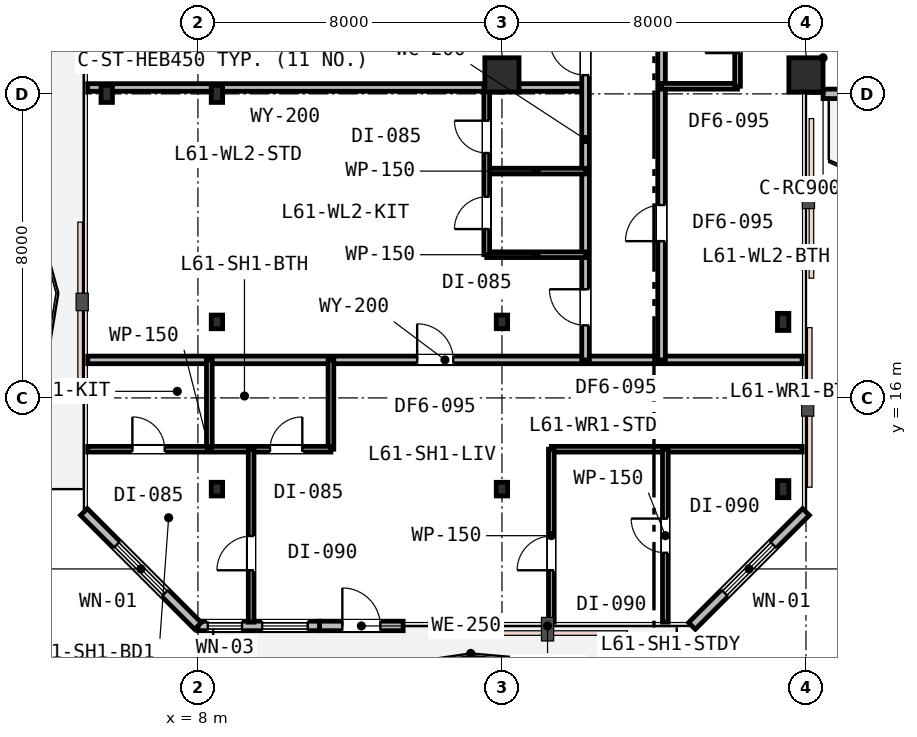
"""IFC4 building model, lengths in metres.
Left out: names, types, materials, properties, quantities, classifications, styles, units other than length and angle.
Written with IfcOpenShell. Run it as: python <this file> out.ifc"""

import sys

from ifc_helpers import new_model, si_unit, direction, frame, frame_2d, origin, origin_2d, place, context, subcontext, project, spatial, rectangle, i_section, extrude, element, fill, save


model = new_model("IFC4")
c1 = context("Model", 3, precision=1e-05, world=origin(), true_north=direction((0.0, 1.0)))
c2 = subcontext(c1, "Body", "Model", "MODEL_VIEW")
j1 = project(units=[si_unit("LENGTHUNIT", "METRE"), si_unit("PLANEANGLEUNIT", "RADIAN")], contexts=[c1])
p1 = place(None, origin())
s1 = spatial("IfcSite", under=j1, at=p1, CompositionType="ELEMENT")
p2 = place(p1, origin())
s2 = spatial("IfcBuilding", under=s1, at=p2, CompositionType="ELEMENT")
p3 = place(p2, frame((0.0, 0.0, 237.4)))
s3 = spatial("IfcBuildingStorey", under=s2, at=p3, CompositionType="ELEMENT", Elevation=237.4)
p4 = place(p3, frame((8.5, 24.0, 0.0), z_axis=(0.0, 0.0, 1.0), x_axis=(1.0, 0.0, 0.0)))
e1 = element("IfcColumn", 1, at=p4, inside=s3, PredefinedType="COLUMN", context=c2, shape_type="SweptSolid", body=[
    extrude(i_section(OverallWidth=0.3, OverallDepth=0.45, WebThickness=0.014, FlangeThickness=0.026, FilletRadius=0.027, at=origin_2d()), origin(), (0.0, 0.0, 1.0), 3.8),
])
for number, where, z_axis, x_axis in (
    (2, (16.0, 24.5, 0.0), (0.0, 0.0, 1.0), (1.0, 0.0, 0.0)),
    (3, (24.0, 24.5, 0.0), (0.0, 0.0, 1.0), (1.0, 0.0, 0.0)),
):
    element("IfcColumn", number, at=place(p3, frame(where, z_axis=z_axis, x_axis=x_axis)), inside=s3, PredefinedType="COLUMN", context=c2, shape_type="SweptSolid", body=[
        extrude(rectangle(XDim=0.9, YDim=0.9, at=origin_2d()), origin(), (0.0, 0.0, 1.0), 3.8),
    ])
for number, where, z_axis, x_axis in (
    (4, (5.6, 24.0, 0.0), (0.0, 0.0, 1.0), (1.0, 0.0, 0.0)),
    (5, (23.4, 13.6, 0.0), (0.0, 0.0, 1.0), (1.0, 0.0, 0.0)),
    (6, (23.4, 18.0, 0.0), (0.0, 0.0, 1.0), (1.0, 0.0, 0.0)),
):
    element("IfcColumn", number, at=place(p3, frame(where, z_axis=z_axis, x_axis=x_axis)), inside=s3, PredefinedType="COLUMN", context=c2, shape_type="SweptSolid", body=[
        extrude(i_section(OverallWidth=0.3, OverallDepth=0.45, WebThickness=0.014, FlangeThickness=0.026, FilletRadius=0.027, at=origin_2d()), origin(), (0.0, 0.0, 1.0), 3.8),
    ])
for number, where, z_axis, x_axis in (
    (7, (8.5, 13.6, 0.0), (0.0, 0.0, 1.0), (1.0, 0.0, 0.0)),
    (8, (16.0, 13.6, 0.0), (0.0, 0.0, 1.0), (1.0, 0.0, 0.0)),
    (9, (8.5, 18.0, 0.0), (0.0, 0.0, 1.0), (1.0, 0.0, 0.0)),
    (10, (16.0, 18.0, 0.0), (0.0, 0.0, 1.0), (1.0, 0.0, 0.0)),
):
    element("IfcColumn", number, at=place(p3, frame(where, z_axis=z_axis, x_axis=x_axis)), inside=s3, PredefinedType="COLUMN", context=c2, shape_type="SweptSolid", body=[
        extrude(i_section(OverallWidth=0.3, OverallDepth=0.36, WebThickness=0.013, FlangeThickness=0.022, FilletRadius=0.027, at=origin_2d()), origin(), (0.0, 0.0, 1.0), 3.8),
    ])
p5 = place(p3, frame((11.2, 10.0, 0.0), z_axis=(0.0, 0.0, 1.0), x_axis=(1.0, 0.0, 0.0)))
e11 = element("IfcWall", 11, at=p5, inside=s3, PredefinedType="STANDARD", context=c2, shape_type="SweptSolid", body=[
    extrude(rectangle(XDim=2.2, YDim=0.25, at=frame_2d((1.1, 0.0))), origin(), (0.0, 0.0, 1.0), 3.53),
])
p6 = place(p5, frame((0.6, 0.0, 0.0)))
e12 = element("IfcOpeningElement", 12, at=p6, cuts=e11, PredefinedType="OPENING", context=c2, shape_type="SweptSolid", body=[
    extrude(rectangle(XDim=1.0, YDim=2.15, at=frame_2d((0.5, 1.075))), frame((0.0, 0.135, 0.0), z_axis=(0.0, -1.0, 0.0), x_axis=(1.0, 0.0, 0.0)), (0.0, 0.0, 1.0), 0.27),
])
p7 = place(p3, frame((8.0, 10.0, 0.0), z_axis=(0.0, 0.0, 1.0), x_axis=(1.0, 0.0, 0.0)))
e13 = element("IfcWall", 13, at=p7, inside=s3, PredefinedType="STANDARD", context=c2, shape_type="SweptSolid", body=[
    extrude(rectangle(XDim=3.2, YDim=0.25, at=frame_2d((1.6, 0.0))), origin(), (0.0, 0.0, 1.0), 3.53),
])
p8 = place(p7, frame((0.26, 0.0, 0.9)))
e14 = element("IfcOpeningElement", 14, at=p8, cuts=e13, PredefinedType="OPENING", context=c2, shape_type="SweptSolid", body=[
    extrude(rectangle(XDim=0.9, YDim=1.55, at=frame_2d((0.45, 0.775))), frame((0.0, 0.135, 0.0), z_axis=(0.0, -1.0, 0.0), x_axis=(1.0, 0.0, 0.0)), (0.0, 0.0, 1.0), 0.27),
])
p9 = place(p7, frame((1.69, 0.0, 0.85)))
e15 = element("IfcOpeningElement", 15, at=p9, cuts=e13, PredefinedType="OPENING", context=c2, shape_type="SweptSolid", body=[
    extrude(rectangle(XDim=1.2, YDim=1.6, at=frame_2d((0.6, 0.8))), frame((0.0, 0.135, 0.0), z_axis=(0.0, -1.0, 0.0), x_axis=(1.0, 0.0, 0.0)), (0.0, 0.0, 1.0), 0.27),
])
p10 = place(p3, frame((21.0, 10.0, 0.0), z_axis=(0.0, 0.0, 1.0), x_axis=(0.707106781187, 0.707106781187, 0.0)))
e16 = element("IfcWall", 16, at=p10, inside=s3, PredefinedType="STANDARD", context=c2, shape_type="SweptSolid", body=[
    extrude(rectangle(XDim=4.243, YDim=0.25, at=frame_2d((2.121, 0.0))), origin(), (0.0, 0.0, 1.0), 3.53),
])
p11 = place(p10, frame((1.221, 0.0, 0.75)))
e17 = element("IfcOpeningElement", 17, at=p11, cuts=e16, PredefinedType="OPENING", context=c2, shape_type="SweptSolid", body=[
    extrude(rectangle(XDim=1.8, YDim=1.85, at=frame_2d((0.9, 0.925))), frame((0.0, 0.135, 0.0), z_axis=(0.0, -1.0, 0.0), x_axis=(1.0, 0.0, 0.0)), (0.0, 0.0, 1.0), 0.27),
])
p12 = place(p3, frame((24.45, 24.0, 0.0), z_axis=(0.0, 0.0, 1.0), x_axis=(1.0, 0.0, 0.0)))
e18 = element("IfcWall", 18, at=p12, inside=s3, PredefinedType="STANDARD", context=c2, shape_type="SweptSolid", body=[
    extrude(rectangle(XDim=0.95, YDim=0.25, at=frame_2d((0.475, 0.0))), origin(), (0.0, 0.0, 1.0), 3.24),
])
p13 = place(p3, frame((5.0, 13.0, 0.0), z_axis=(0.0, 0.0, 1.0), x_axis=(0.707106781187, -0.707106781187, 0.0)))
e19 = element("IfcWall", 19, at=p13, inside=s3, PredefinedType="STANDARD", context=c2, shape_type="SweptSolid", body=[
    extrude(rectangle(XDim=4.243, YDim=0.25, at=frame_2d((2.121, 0.0))), origin(), (0.0, 0.0, 1.0), 3.53),
])
p14 = place(p13, frame((1.221, 0.0, 0.75)))
e20 = element("IfcOpeningElement", 20, at=p14, cuts=e19, PredefinedType="OPENING", context=c2, shape_type="SweptSolid", body=[
    extrude(rectangle(XDim=1.8, YDim=1.85, at=frame_2d((0.9, 0.925))), frame((0.0, 0.135, 0.0), z_axis=(0.0, -1.0, 0.0), x_axis=(1.0, 0.0, 0.0)), (0.0, 0.0, 1.0), 0.27),
])
p15 = place(p3, frame((5.1, 17.0, 0.0), z_axis=(0.0, 0.0, 1.0), x_axis=(1.0, 0.0, 0.0)))
e21 = element("IfcWall", 21, at=p15, inside=s3, PredefinedType="PARTITIONING", context=c2, shape_type="SweptSolid", body=[
    extrude(rectangle(XDim=18.8, YDim=0.2, at=frame_2d((9.4, 0.0))), origin(), (0.0, 0.0, 1.0), 2.92),
])
p16 = place(p15, frame((8.668, 0.0, 0.0)))
e22 = element("IfcOpeningElement", 22, at=p16, cuts=e21, PredefinedType="OPENING", context=c2, shape_type="SweptSolid", body=[
    extrude(rectangle(XDim=0.95, YDim=2.15, at=frame_2d((0.475, 1.075))), frame((0.0, 0.11, 0.0), z_axis=(0.0, -1.0, 0.0), x_axis=(1.0, 0.0, 0.0)), (0.0, 0.0, 1.0), 0.22),
])
p17 = place(p3, frame((5.1, 24.168, 0.0), z_axis=(0.0, 0.0, 1.0), x_axis=(1.0, 0.0, 0.0)))
e23 = element("IfcWall", 23, at=p17, inside=s3, PredefinedType="PARTITIONING", context=c2, shape_type="SweptSolid", body=[
    extrude(rectangle(XDim=13.1, YDim=0.2, at=frame_2d((6.55, 0.0))), origin(), (0.0, 0.0, 1.0), 2.92),
])
p18 = place(p3, frame((18.2, 17.0, 0.0), z_axis=(0.0, 0.0, 1.0), x_axis=(0.0, 1.0, 0.0)))
e24 = element("IfcWall", 24, at=p18, inside=s3, PredefinedType="PARTITIONING", context=c2, shape_type="SweptSolid", body=[
    extrude(rectangle(XDim=11.6, YDim=0.2, at=frame_2d((5.8, 0.0))), origin(), (0.0, 0.0, 1.0), 2.92),
])
p19 = place(p18, frame((7.493, 0.0, 0.0)))
e25 = element("IfcOpeningElement", 25, at=p19, cuts=e24, PredefinedType="OPENING", context=c2, shape_type="SweptSolid", body=[
    extrude(rectangle(XDim=0.95, YDim=2.15, at=frame_2d((0.475, 1.075))), frame((0.0, 0.11, 0.0), z_axis=(0.0, -1.0, 0.0), x_axis=(1.0, 0.0, 0.0)), (0.0, 0.0, 1.0), 0.22),
])
p20 = place(p18, frame((0.909, 0.0, 0.0)))
e26 = element("IfcOpeningElement", 26, at=p20, cuts=e24, PredefinedType="OPENING", context=c2, shape_type="SweptSolid", body=[
    extrude(rectangle(XDim=0.95, YDim=2.15, at=frame_2d((0.475, 1.075))), frame((0.0, 0.11, 0.0), z_axis=(0.0, -1.0, 0.0), x_axis=(1.0, 0.0, 0.0)), (0.0, 0.0, 1.0), 0.22),
])
for number, where, z_axis, x_axis in (
    (27, (15.6, 19.768, 0.0), (0.0, 0.0, 1.0), (1.0, 0.0, 0.0)),
    (28, (15.6, 21.968, 0.0), (0.0, 0.0, 1.0), (1.0, 0.0, 0.0)),
):
    element("IfcWall", number, at=place(p3, frame(where, z_axis=z_axis, x_axis=x_axis)), inside=s3, PredefinedType="PARTITIONING", context=c2, shape_type="SweptSolid", body=[
        extrude(rectangle(XDim=2.6, YDim=0.15, at=frame_2d((1.3, 0.0))), origin(), (0.0, 0.0, 1.0), 2.92),
    ])
p21 = place(p3, frame((15.6, 19.768, 0.0), z_axis=(0.0, 0.0, 1.0), x_axis=(0.0, 1.0, 0.0)))
e29 = element("IfcWall", 29, at=p21, inside=s3, PredefinedType="PARTITIONING", context=c2, shape_type="SweptSolid", body=[
    extrude(rectangle(XDim=4.4, YDim=0.15, at=frame_2d((2.2, 0.0))), origin(), (0.0, 0.0, 1.0), 2.92),
])
p22 = place(p21, frame((0.675, 0.0, 0.0)))
e30 = element("IfcOpeningElement", 30, at=p22, cuts=e29, PredefinedType="OPENING", context=c2, shape_type="SweptSolid", body=[
    extrude(rectangle(XDim=0.85, YDim=2.15, at=frame_2d((0.425, 1.075))), frame((0.0, 0.085, 0.0), z_axis=(0.0, -1.0, 0.0), x_axis=(1.0, 0.0, 0.0)), (0.0, 0.0, 1.0), 0.17),
])
p23 = place(p21, frame((2.677, 0.0, 0.0)))
e31 = element("IfcOpeningElement", 31, at=p23, cuts=e29, PredefinedType="OPENING", context=c2, shape_type="SweptSolid", body=[
    extrude(rectangle(XDim=0.85, YDim=2.15, at=frame_2d((0.425, 1.075))), frame((0.0, 0.085, 0.0), z_axis=(0.0, -1.0, 0.0), x_axis=(1.0, 0.0, 0.0)), (0.0, 0.0, 1.0), 0.17),
])
p24 = place(p3, frame((20.2, 17.0, 0.0), z_axis=(0.0, 0.0, 1.0), x_axis=(0.0, 1.0, 0.0)))
e32 = element("IfcWall", 32, at=p24, inside=s3, PredefinedType="PARTITIONING", context=c2, shape_type="SweptSolid", body=[
    extrude(rectangle(XDim=11.6, YDim=0.2, at=frame_2d((5.8, 0.0))), origin(), (0.0, 0.0, 1.0), 2.92),
])
p25 = place(p24, frame((3.125, 0.0, 0.0)))
e33 = element("IfcOpeningElement", 33, at=p25, cuts=e32, PredefinedType="OPENING", context=c2, shape_type="SweptSolid", body=[
    extrude(rectangle(XDim=0.95, YDim=2.15, at=frame_2d((0.475, 1.075))), frame((0.0, 0.11, 0.0), z_axis=(0.0, -1.0, 0.0), x_axis=(1.0, 0.0, 0.0)), (0.0, 0.0, 1.0), 0.22),
])
p26 = place(p3, frame((20.2, 24.2, 0.0), z_axis=(0.0, 0.0, 1.0), x_axis=(1.0, 0.0, 0.0)))
e34 = element("IfcWall", 34, at=p26, inside=s3, PredefinedType="PARTITIONING", context=c2, shape_type="SweptSolid", body=[
    extrude(rectangle(XDim=2.0, YDim=0.15, at=frame_2d((1.0, 0.0))), origin(), (0.0, 0.0, 1.0), 2.92),
])
p27 = place(p3, frame((22.2, 24.2, 0.0), z_axis=(0.0, 0.0, 1.0), x_axis=(0.0, 1.0, 0.0)))
e35 = element("IfcWall", 35, at=p27, inside=s3, PredefinedType="PARTITIONING", context=c2, shape_type="SweptSolid", body=[
    extrude(rectangle(XDim=4.4, YDim=0.15, at=frame_2d((2.2, 0.0))), origin(), (0.0, 0.0, 1.0), 2.92),
])
p28 = place(p27, frame((0.873, 0.0, 0.0)))
e36 = element("IfcOpeningElement", 36, at=p28, cuts=e35, PredefinedType="OPENING", context=c2, shape_type="SweptSolid", body=[
    extrude(rectangle(XDim=0.85, YDim=2.15, at=frame_2d((0.425, 1.075))), frame((0.0, 0.085, 0.0), z_axis=(0.0, -1.0, 0.0), x_axis=(1.0, 0.0, 0.0)), (0.0, 0.0, 1.0), 0.17),
])
p29 = place(p27, frame((2.875, 0.0, 0.0)))
e37 = element("IfcOpeningElement", 37, at=p29, cuts=e35, PredefinedType="OPENING", context=c2, shape_type="SweptSolid", body=[
    extrude(rectangle(XDim=0.85, YDim=2.15, at=frame_2d((0.425, 1.075))), frame((0.0, 0.085, 0.0), z_axis=(0.0, -1.0, 0.0), x_axis=(1.0, 0.0, 0.0)), (0.0, 0.0, 1.0), 0.17),
])
p30 = place(p3, frame((11.5, 14.65, 0.0), z_axis=(0.0, 0.0, 1.0), x_axis=(0.0, 1.0, 0.0)))
e38 = element("IfcWall", 38, at=p30, inside=s3, PredefinedType="PARTITIONING", context=c2, shape_type="SweptSolid", body=[
    extrude(rectangle(XDim=2.35, YDim=0.15, at=frame_2d((1.175, 0.0))), origin(), (0.0, 0.0, 1.0), 3.22),
])
p31 = place(p3, frame((8.3, 14.65, 0.0), z_axis=(0.0, 0.0, 1.0), x_axis=(0.0, 1.0, 0.0)))
e39 = element("IfcWall", 39, at=p31, inside=s3, PredefinedType="PARTITIONING", context=c2, shape_type="SweptSolid", body=[
    extrude(rectangle(XDim=2.35, YDim=0.15, at=frame_2d((1.175, 0.0))), origin(), (0.0, 0.0, 1.0), 2.92),
])
p32 = place(p3, frame((5.1, 14.65, 0.0), z_axis=(0.0, 0.0, 1.0), x_axis=(1.0, 0.0, 0.0)))
e40 = element("IfcWall", 40, at=p32, inside=s3, PredefinedType="PARTITIONING", context=c2, shape_type="SweptSolid", body=[
    extrude(rectangle(XDim=6.4, YDim=0.15, at=frame_2d((3.2, 0.0))), origin(), (0.0, 0.0, 1.0), 2.92),
])
p33 = place(p32, frame((1.175, 0.0, 0.0)))
e41 = element("IfcOpeningElement", 41, at=p33, cuts=e40, PredefinedType="OPENING", context=c2, shape_type="SweptSolid", body=[
    extrude(rectangle(XDim=0.85, YDim=2.15, at=frame_2d((0.425, 1.075))), frame((0.0, 0.085, 0.0), z_axis=(0.0, -1.0, 0.0), x_axis=(1.0, 0.0, 0.0)), (0.0, 0.0, 1.0), 0.17),
])
p34 = place(p32, frame((4.797, 0.0, 0.0)))
e42 = element("IfcOpeningElement", 42, at=p34, cuts=e40, PredefinedType="OPENING", context=c2, shape_type="SweptSolid", body=[
    extrude(rectangle(XDim=0.85, YDim=2.15, at=frame_2d((0.425, 1.075))), frame((0.0, 0.085, 0.0), z_axis=(0.0, -1.0, 0.0), x_axis=(1.0, 0.0, 0.0)), (0.0, 0.0, 1.0), 0.17),
])
p35 = place(p3, frame((17.3, 14.65, 0.0), z_axis=(0.0, 0.0, 1.0), x_axis=(1.0, 0.0, 0.0)))
e43 = element("IfcWall", 43, at=p35, inside=s3, PredefinedType="PARTITIONING", context=c2, shape_type="SweptSolid", body=[
    extrude(rectangle(XDim=6.6, YDim=0.15, at=frame_2d((3.3, 0.0))), origin(), (0.0, 0.0, 1.0), 3.22),
])
p36 = place(p3, frame((9.4, 10.1, 0.0), z_axis=(0.0, 0.0, 1.0), x_axis=(0.0, 1.0, 0.0)))
e44 = element("IfcWall", 44, at=p36, inside=s3, PredefinedType="PARTITIONING", context=c2, shape_type="SweptSolid", body=[
    extrude(rectangle(XDim=4.55, YDim=0.15, at=frame_2d((2.275, 0.0))), origin(), (0.0, 0.0, 1.0), 2.92),
])
p37 = place(p36, frame((1.365, 0.0, 0.0)))
e45 = element("IfcOpeningElement", 45, at=p37, cuts=e44, PredefinedType="OPENING", context=c2, shape_type="SweptSolid", body=[
    extrude(rectangle(XDim=0.9, YDim=2.15, at=frame_2d((0.45, 1.075))), frame((0.0, 0.085, 0.0), z_axis=(0.0, -1.0, 0.0), x_axis=(1.0, 0.0, 0.0)), (0.0, 0.0, 1.0), 0.17),
])
p38 = place(p3, frame((20.3, 10.1, 0.0), z_axis=(0.0, 0.0, 1.0), x_axis=(0.0, 1.0, 0.0)))
e46 = element("IfcWall", 46, at=p38, inside=s3, PredefinedType="PARTITIONING", context=c2, shape_type="SweptSolid", body=[
    extrude(rectangle(XDim=4.55, YDim=0.15, at=frame_2d((2.275, 0.0))), origin(), (0.0, 0.0, 1.0), 2.92),
])
p39 = place(p38, frame((1.825, 0.0, 0.0)))
e47 = element("IfcOpeningElement", 47, at=p39, cuts=e46, PredefinedType="OPENING", context=c2, shape_type="SweptSolid", body=[
    extrude(rectangle(XDim=0.9, YDim=2.15, at=frame_2d((0.45, 1.075))), frame((0.0, 0.085, 0.0), z_axis=(0.0, -1.0, 0.0), x_axis=(1.0, 0.0, 0.0)), (0.0, 0.0, 1.0), 0.17),
])
p40 = place(p3, frame((17.3, 10.1, 0.0), z_axis=(0.0, 0.0, 1.0), x_axis=(0.0, 1.0, 0.0)))
e48 = element("IfcWall", 48, at=p40, inside=s3, PredefinedType="PARTITIONING", context=c2, shape_type="SweptSolid", body=[
    extrude(rectangle(XDim=4.55, YDim=0.15, at=frame_2d((2.275, 0.0))), origin(), (0.0, 0.0, 1.0), 2.92),
])
p41 = place(p40, frame((1.365, 0.0, 0.0)))
e49 = element("IfcOpeningElement", 49, at=p41, cuts=e48, PredefinedType="OPENING", context=c2, shape_type="SweptSolid", body=[
    extrude(rectangle(XDim=0.9, YDim=2.15, at=frame_2d((0.45, 1.075))), frame((0.0, 0.085, 0.0), z_axis=(0.0, -1.0, 0.0), x_axis=(1.0, 0.0, 0.0)), (0.0, 0.0, 1.0), 0.17),
])
p42 = place(p6, origin())
e50 = element("IfcDoor", 50, at=p42, inside=s3, OperationType="SINGLE_SWING_LEFT", PredefinedType="DOOR", context=c2, shape_type="SweptSolid", body=[
    extrude(rectangle(XDim=1.0, YDim=2.15, at=frame_2d((0.5, 1.075))), frame((0.0, 0.025, 0.0), z_axis=(0.0, -1.0, 0.0), x_axis=(1.0, 0.0, 0.0)), (0.0, 0.0, 1.0), 0.05),
])
fill(e12, e50)
p43 = place(p8, origin())
e51 = element("IfcWindow", 51, at=p43, inside=s3, PartitioningType="SINGLE_PANEL", PredefinedType="WINDOW", context=c2, shape_type="SweptSolid", body=[
    extrude(rectangle(XDim=0.9, YDim=1.55, at=frame_2d((0.45, 0.775))), frame((0.0, 0.03, 0.0), z_axis=(0.0, -1.0, 0.0), x_axis=(1.0, 0.0, 0.0)), (0.0, 0.0, 1.0), 0.06),
])
fill(e14, e51)
p44 = place(p9, origin())
e52 = element("IfcWindow", 52, at=p44, inside=s3, PartitioningType="SINGLE_PANEL", PredefinedType="WINDOW", context=c2, shape_type="SweptSolid", body=[
    extrude(rectangle(XDim=1.2, YDim=1.6, at=frame_2d((0.6, 0.8))), frame((0.0, 0.03, 0.0), z_axis=(0.0, -1.0, 0.0), x_axis=(1.0, 0.0, 0.0)), (0.0, 0.0, 1.0), 0.06),
])
fill(e15, e52)
p45 = place(p11, origin())
e53 = element("IfcWindow", 53, at=p45, inside=s3, PartitioningType="SINGLE_PANEL", PredefinedType="WINDOW", context=c2, shape_type="SweptSolid", body=[
    extrude(rectangle(XDim=1.8, YDim=1.85, at=frame_2d((0.9, 0.925))), frame((0.0, 0.03, 0.0), z_axis=(0.0, -1.0, 0.0), x_axis=(1.0, 0.0, 0.0)), (0.0, 0.0, 1.0), 0.06),
])
fill(e17, e53)
p46 = place(p14, origin())
e54 = element("IfcWindow", 54, at=p46, inside=s3, PartitioningType="SINGLE_PANEL", PredefinedType="WINDOW", context=c2, shape_type="SweptSolid", body=[
    extrude(rectangle(XDim=1.8, YDim=1.85, at=frame_2d((0.9, 0.925))), frame((0.0, 0.03, 0.0), z_axis=(0.0, -1.0, 0.0), x_axis=(1.0, 0.0, 0.0)), (0.0, 0.0, 1.0), 0.06),
])
fill(e20, e54)
p47 = place(p19, origin())
e55 = element("IfcDoor", 55, at=p47, inside=s3, OperationType="SINGLE_SWING_RIGHT", PredefinedType="DOOR", context=c2, shape_type="SweptSolid", body=[
    extrude(rectangle(XDim=0.95, YDim=2.15, at=frame_2d((0.475, 1.075))), frame((0.0, 0.025, 0.0), z_axis=(0.0, -1.0, 0.0), x_axis=(1.0, 0.0, 0.0)), (0.0, 0.0, 1.0), 0.05),
])
fill(e25, e55)
p48 = place(p20, origin())
e56 = element("IfcDoor", 56, at=p48, inside=s3, OperationType="SINGLE_SWING_RIGHT", PredefinedType="DOOR", context=c2, shape_type="SweptSolid", body=[
    extrude(rectangle(XDim=0.95, YDim=2.15, at=frame_2d((0.475, 1.075))), frame((0.0, 0.025, 0.0), z_axis=(0.0, -1.0, 0.0), x_axis=(1.0, 0.0, 0.0)), (0.0, 0.0, 1.0), 0.05),
])
fill(e26, e56)
p49 = place(p22, origin())
e57 = element("IfcDoor", 57, at=p49, inside=s3, OperationType="SINGLE_SWING_LEFT", PredefinedType="DOOR", context=c2, shape_type="SweptSolid", body=[
    extrude(rectangle(XDim=0.85, YDim=2.15, at=frame_2d((0.425, 1.075))), frame((0.0, 0.025, 0.0), z_axis=(0.0, -1.0, 0.0), x_axis=(1.0, 0.0, 0.0)), (0.0, 0.0, 1.0), 0.05),
])
fill(e30, e57)
p50 = place(p23, origin())
e58 = element("IfcDoor", 58, at=p50, inside=s3, OperationType="SINGLE_SWING_RIGHT", PredefinedType="DOOR", context=c2, shape_type="SweptSolid", body=[
    extrude(rectangle(XDim=0.85, YDim=2.15, at=frame_2d((0.425, 1.075))), frame((0.0, 0.025, 0.0), z_axis=(0.0, -1.0, 0.0), x_axis=(1.0, 0.0, 0.0)), (0.0, 0.0, 1.0), 0.05),
])
fill(e31, e58)
p51 = place(p25, origin())
e59 = element("IfcDoor", 59, at=p51, inside=s3, OperationType="SINGLE_SWING_LEFT", PredefinedType="DOOR", context=c2, shape_type="SweptSolid", body=[
    extrude(rectangle(XDim=0.95, YDim=2.15, at=frame_2d((0.475, 1.075))), frame((0.0, 0.025, 0.0), z_axis=(0.0, -1.0, 0.0), x_axis=(1.0, 0.0, 0.0)), (0.0, 0.0, 1.0), 0.05),
])
fill(e33, e59)
p52 = place(p28, origin())
e60 = element("IfcDoor", 60, at=p52, inside=s3, OperationType="SINGLE_SWING_LEFT", PredefinedType="DOOR", context=c2, shape_type="SweptSolid", body=[
    extrude(rectangle(XDim=0.85, YDim=2.15, at=frame_2d((0.425, 1.075))), frame((0.0, 0.025, 0.0), z_axis=(0.0, -1.0, 0.0), x_axis=(1.0, 0.0, 0.0)), (0.0, 0.0, 1.0), 0.05),
])
fill(e36, e60)
p53 = place(p16, origin())
e61 = element("IfcDoor", 61, at=p53, inside=s3, OperationType="SINGLE_SWING_LEFT", PredefinedType="DOOR", context=c2, shape_type="SweptSolid", body=[
    extrude(rectangle(XDim=0.95, YDim=2.15, at=frame_2d((0.475, 1.075))), frame((0.0, 0.025, 0.0), z_axis=(0.0, -1.0, 0.0), x_axis=(1.0, 0.0, 0.0)), (0.0, 0.0, 1.0), 0.05),
])
fill(e22, e61)
p54 = place(p33, origin())
e62 = element("IfcDoor", 62, at=p54, inside=s3, OperationType="SINGLE_SWING_LEFT", PredefinedType="DOOR", context=c2, shape_type="SweptSolid", body=[
    extrude(rectangle(XDim=0.85, YDim=2.15, at=frame_2d((0.425, 1.075))), frame((0.0, 0.025, 0.0), z_axis=(0.0, -1.0, 0.0), x_axis=(1.0, 0.0, 0.0)), (0.0, 0.0, 1.0), 0.05),
])
fill(e41, e62)
p55 = place(p34, origin())
e63 = element("IfcDoor", 63, at=p55, inside=s3, OperationType="SINGLE_SWING_RIGHT", PredefinedType="DOOR", context=c2, shape_type="SweptSolid", body=[
    extrude(rectangle(XDim=0.85, YDim=2.15, at=frame_2d((0.425, 1.075))), frame((0.0, 0.025, 0.0), z_axis=(0.0, -1.0, 0.0), x_axis=(1.0, 0.0, 0.0)), (0.0, 0.0, 1.0), 0.05),
])
fill(e42, e63)
p56 = place(p37, origin())
e64 = element("IfcDoor", 64, at=p56, inside=s3, OperationType="SINGLE_SWING_LEFT", PredefinedType="DOOR", context=c2, shape_type="SweptSolid", body=[
    extrude(rectangle(XDim=0.9, YDim=2.15, at=frame_2d((0.45, 1.075))), frame((0.0, 0.025, 0.0), z_axis=(0.0, -1.0, 0.0), x_axis=(1.0, 0.0, 0.0)), (0.0, 0.0, 1.0), 0.05),
])
fill(e45, e64)
p57 = place(p39, origin())
e65 = element("IfcDoor", 65, at=p57, inside=s3, OperationType="SINGLE_SWING_RIGHT", PredefinedType="DOOR", context=c2, shape_type="SweptSolid", body=[
    extrude(rectangle(XDim=0.9, YDim=2.15, at=frame_2d((0.45, 1.075))), frame((0.0, 0.025, 0.0), z_axis=(0.0, -1.0, 0.0), x_axis=(1.0, 0.0, 0.0)), (0.0, 0.0, 1.0), 0.05),
])
fill(e47, e65)
p58 = place(p41, origin())
e66 = element("IfcDoor", 66, at=p58, inside=s3, OperationType="SINGLE_SWING_LEFT", PredefinedType="DOOR", context=c2, shape_type="SweptSolid", body=[
    extrude(rectangle(XDim=0.9, YDim=2.15, at=frame_2d((0.45, 1.075))), frame((0.0, 0.025, 0.0), z_axis=(0.0, -1.0, 0.0), x_axis=(1.0, 0.0, 0.0)), (0.0, 0.0, 1.0), 0.05),
])
fill(e49, e66)
save(model, sys.argv[1])
